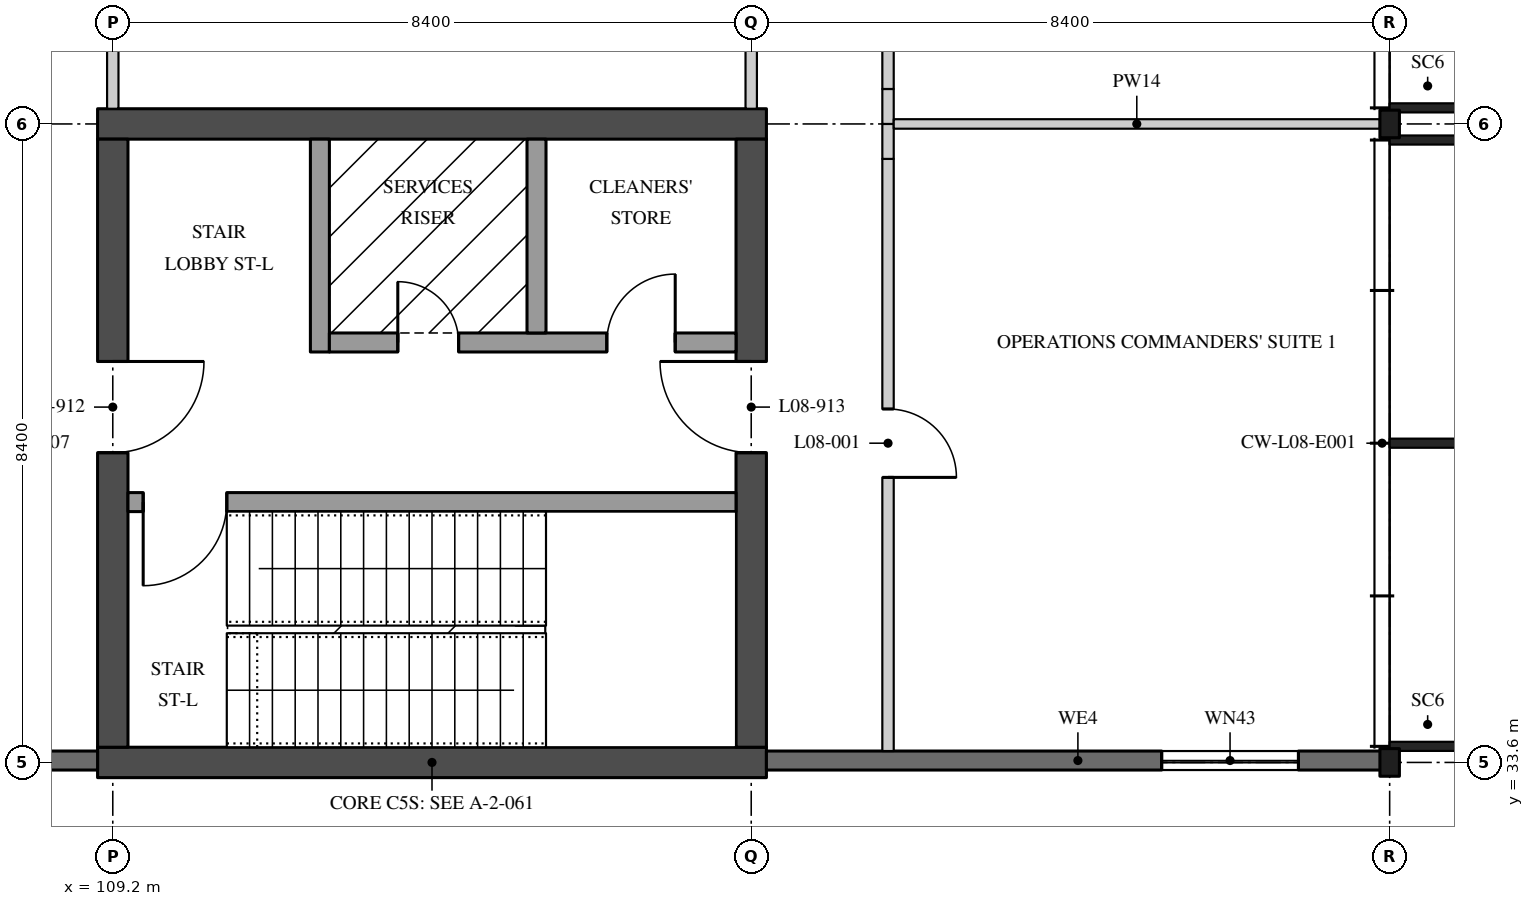
"""IFC4 building model, lengths in metres.
Left out: names, types, materials, properties, quantities, classifications, styles, units other than length and angle.
Written with IfcOpenShell. Run it as: python <this file> out.ifc"""

import sys

from ifc_helpers import new_model, si_unit, direction, frame, frame_2d, origin, origin_2d, place, context, subcontext, project, spatial, rectangle, i_section, extrude, element, fill, save


model = new_model("IFC4")
c1 = context("Model", 3, precision=1e-05, world=origin(), true_north=direction((0.0, 1.0)))
c2 = subcontext(c1, "Body", "Model", "MODEL_VIEW")
j1 = project(units=[si_unit("LENGTHUNIT", "METRE"), si_unit("PLANEANGLEUNIT", "RADIAN")], contexts=[c1])
p1 = place(None, origin())
s1 = spatial("IfcSite", under=j1, at=p1, CompositionType="ELEMENT")
p2 = place(p1, origin())
s2 = spatial("IfcBuilding", under=s1, at=p2, CompositionType="ELEMENT")
p3 = place(p2, frame((0.0, 0.0, 36.9)))
s3 = spatial("IfcBuildingStorey", under=s2, at=p3, CompositionType="ELEMENT", Elevation=36.9)
for number, where, z_axis, x_axis in (
    (1, (126.0, 33.6, 0.0), (0.0, 0.0, 1.0), (1.0, 0.0, 0.0)),
    (2, (126.0, 42.0, 0.0), (0.0, 0.0, 1.0), (1.0, 0.0, 0.0)),
):
    element("IfcColumn", number, at=place(p3, frame(where, z_axis=z_axis, x_axis=x_axis)), inside=s3, PredefinedType="COLUMN", context=c2, shape_type="SweptSolid", body=[
        extrude(i_section(OverallWidth=0.257, OverallDepth=0.363, WebThickness=0.013, FlangeThickness=0.022, FilletRadius=0.015, at=origin_2d()), origin(), (0.0, 0.0, 1.0), 4.37),
    ])
for number, where, z_axis, x_axis in (
    (3, (109.0, 33.6, 0.0), (0.0, 0.0, 1.0), (1.0, 0.0, 0.0)),
    (4, (109.0, 42.0, 0.0), (0.0, 0.0, 1.0), (1.0, 0.0, 0.0)),
):
    element("IfcWall", number, at=place(p3, frame(where, z_axis=z_axis, x_axis=x_axis)), inside=s3, PredefinedType="SHEAR", context=c2, shape_type="SweptSolid", body=[
        extrude(rectangle(XDim=8.8, YDim=0.4, at=frame_2d((4.4, 0.0))), origin(), (0.0, 0.0, 1.0), 4.37),
    ])
p4 = place(p3, frame((109.2, 33.8, 0.0), z_axis=(0.0, 0.0, 1.0), x_axis=(0.0, 1.0, 0.0)))
e5 = element("IfcWall", 5, at=p4, inside=s3, PredefinedType="SHEAR", context=c2, shape_type="SweptSolid", body=[
    extrude(rectangle(XDim=8.0, YDim=0.4, at=frame_2d((4.0, 0.0))), origin(), (0.0, 0.0, 1.0), 4.37),
])
p5 = place(p4, frame((3.875, 0.0, 0.0)))
e6 = element("IfcOpeningElement", 6, at=p5, cuts=e5, PredefinedType="OPENING", context=c2, shape_type="SweptSolid", body=[
    extrude(rectangle(XDim=1.2, YDim=2.1, at=frame_2d((0.6, 1.05))), frame((0.0, 0.21, 0.0), z_axis=(0.0, -1.0, 0.0), x_axis=(1.0, 0.0, 0.0)), (0.0, 0.0, 1.0), 0.42),
])
p6 = place(p3, frame((117.6, 33.8, 0.0), z_axis=(0.0, 0.0, 1.0), x_axis=(0.0, 1.0, 0.0)))
e7 = element("IfcWall", 7, at=p6, inside=s3, PredefinedType="SHEAR", context=c2, shape_type="SweptSolid", body=[
    extrude(rectangle(XDim=8.0, YDim=0.4, at=frame_2d((4.0, 0.0))), origin(), (0.0, 0.0, 1.0), 4.37),
])
p7 = place(p6, frame((3.875, 0.0, 0.0)))
e8 = element("IfcOpeningElement", 8, at=p7, cuts=e7, PredefinedType="OPENING", context=c2, shape_type="SweptSolid", body=[
    extrude(rectangle(XDim=1.2, YDim=2.1, at=frame_2d((0.6, 1.05))), frame((0.0, 0.21, 0.0), z_axis=(0.0, -1.0, 0.0), x_axis=(1.0, 0.0, 0.0)), (0.0, 0.0, 1.0), 0.42),
])
p8 = place(p3, frame((109.4, 37.025, 0.0), z_axis=(0.0, 0.0, 1.0), x_axis=(1.0, 0.0, 0.0)))
e9 = element("IfcWall", 9, at=p8, inside=s3, PredefinedType="SOLIDWALL", context=c2, shape_type="SweptSolid", body=[
    extrude(rectangle(XDim=8.0, YDim=0.25, at=frame_2d((4.0, 0.0))), origin(), (0.0, 0.0, 1.0), 4.37),
])
p9 = place(p8, frame((0.2, 0.0, 0.0)))
e10 = element("IfcOpeningElement", 10, at=p9, cuts=e9, PredefinedType="OPENING", context=c2, shape_type="SweptSolid", body=[
    extrude(rectangle(XDim=1.1, YDim=2.1, at=frame_2d((0.55, 1.05))), frame((0.0, 0.135, 0.0), z_axis=(0.0, -1.0, 0.0), x_axis=(1.0, 0.0, 0.0)), (0.0, 0.0, 1.0), 0.27),
])
p10 = place(p3, frame((111.925, 39.0, 0.0), z_axis=(0.0, 0.0, 1.0), x_axis=(0.0, 1.0, 0.0)))
e11 = element("IfcWall", 11, at=p10, inside=s3, PredefinedType="SOLIDWALL", context=c2, shape_type="SweptSolid", body=[
    extrude(rectangle(XDim=2.8, YDim=0.25, at=frame_2d((1.4, 0.0))), origin(), (0.0, 0.0, 1.0), 4.37),
])
p11 = place(p3, frame((112.05, 39.125, 0.0), z_axis=(0.0, 0.0, 1.0), x_axis=(1.0, 0.0, 0.0)))
e12 = element("IfcWall", 12, at=p11, inside=s3, PredefinedType="SOLIDWALL", context=c2, shape_type="SweptSolid", body=[
    extrude(rectangle(XDim=5.35, YDim=0.25, at=frame_2d((2.675, 0.0))), origin(), (0.0, 0.0, 1.0), 4.37),
])
p12 = place(p11, frame((3.65, 0.0, 0.0)))
e13 = element("IfcOpeningElement", 13, at=p12, cuts=e12, PredefinedType="OPENING", context=c2, shape_type="SweptSolid", body=[
    extrude(rectangle(XDim=0.9, YDim=2.1, at=frame_2d((0.45, 1.05))), frame((0.0, 0.135, 0.0), z_axis=(0.0, -1.0, 0.0), x_axis=(1.0, 0.0, 0.0)), (0.0, 0.0, 1.0), 0.27),
])
p13 = place(p11, frame((0.9, 0.0, 0.0)))
e14 = element("IfcOpeningElement", 14, at=p13, cuts=e12, PredefinedType="OPENING", context=c2, shape_type="SweptSolid", body=[
    extrude(rectangle(XDim=0.8, YDim=2.1, at=frame_2d((0.4, 1.05))), frame((0.0, 0.135, 0.0), z_axis=(0.0, -1.0, 0.0), x_axis=(1.0, 0.0, 0.0)), (0.0, 0.0, 1.0), 0.27),
])
p14 = place(p3, frame((114.775, 39.25, 0.0), z_axis=(0.0, 0.0, 1.0), x_axis=(0.0, 1.0, 0.0)))
e15 = element("IfcWall", 15, at=p14, inside=s3, PredefinedType="SOLIDWALL", context=c2, shape_type="SweptSolid", body=[
    extrude(rectangle(XDim=2.55, YDim=0.25, at=frame_2d((1.275, 0.0))), origin(), (0.0, 0.0, 1.0), 4.37),
])
p15 = place(p3, frame((119.4, 33.75, 0.0), z_axis=(0.0, 0.0, 1.0), x_axis=(0.0, 1.0, 0.0)))
e16 = element("IfcWall", 16, at=p15, inside=s3, PredefinedType="PARTITIONING", context=c2, shape_type="SweptSolid", body=[
    extrude(rectangle(XDim=7.79, YDim=0.15, at=frame_2d((3.895, 0.0))), origin(), (0.0, 0.0, 1.0), 4.37),
])
p16 = place(p15, frame((3.6, 0.0, 0.0)))
e17 = element("IfcOpeningElement", 17, at=p16, cuts=e16, PredefinedType="OPENING", context=c2, shape_type="SweptSolid", body=[
    extrude(rectangle(XDim=0.9, YDim=2.1, at=frame_2d((0.45, 1.05))), frame((0.0, 0.085, 0.0), z_axis=(0.0, -1.0, 0.0), x_axis=(1.0, 0.0, 0.0)), (0.0, 0.0, 1.0), 0.17),
])
for number, where, z_axis, x_axis in (
    (18, (119.4, 41.54, 0.0), (0.0, 0.0, 1.0), (0.0, 1.0, 0.0)),
    (19, (119.4, 42.0, 0.0), (0.0, 0.0, 1.0), (0.0, 1.0, 0.0)),
):
    element("IfcWall", number, at=place(p3, frame(where, z_axis=z_axis, x_axis=x_axis)), inside=s3, PredefinedType="PARTITIONING", context=c2, shape_type="SweptSolid", body=[
        extrude(rectangle(XDim=0.46, YDim=0.15, at=frame_2d((0.23, 0.0))), origin(), (0.0, 0.0, 1.0), 3.817),
    ])
p17 = place(p3, frame((119.4, 42.46, 0.0), z_axis=(0.0, 0.0, 1.0), x_axis=(0.0, 1.0, 0.0)))
e20 = element("IfcWall", 20, at=p17, inside=s3, PredefinedType="PARTITIONING", context=c2, shape_type="SweptSolid", body=[
    extrude(rectangle(XDim=7.48, YDim=0.15, at=frame_2d((3.74, 0.0))), origin(), (0.0, 0.0, 1.0), 4.37),
])
p18 = place(p17, frame((3.29, 0.0, 0.0)))
e21 = element("IfcOpeningElement", 21, at=p18, cuts=e20, PredefinedType="OPENING", context=c2, shape_type="SweptSolid", body=[
    extrude(rectangle(XDim=0.9, YDim=2.1, at=frame_2d((0.45, 1.05))), frame((0.0, 0.085, 0.0), z_axis=(0.0, -1.0, 0.0), x_axis=(1.0, 0.0, 0.0)), (0.0, 0.0, 1.0), 0.17),
])
p19 = place(p3, frame((117.6, 42.2, 0.0), z_axis=(0.0, 0.0, 1.0), x_axis=(0.0, 1.0, 0.0)))
e22 = element("IfcWall", 22, at=p19, inside=s3, PredefinedType="PARTITIONING", context=c2, shape_type="SweptSolid", body=[
    extrude(rectangle(XDim=8.0, YDim=0.15, at=frame_2d((4.0, 0.0))), origin(), (0.0, 0.0, 1.0), 3.817),
])
p20 = place(p19, frame((2.35, 0.0, 0.0)))
e23 = element("IfcOpeningElement", 23, at=p20, cuts=e22, PredefinedType="OPENING", context=c2, shape_type="SweptSolid", body=[
    extrude(rectangle(XDim=1.2, YDim=2.4, at=frame_2d((0.6, 1.2))), frame((0.0, 0.085, 0.0), z_axis=(0.0, -1.0, 0.0), x_axis=(1.0, 0.0, 0.0)), (0.0, 0.0, 1.0), 0.17),
])
p21 = place(p3, frame((109.2, 42.2, 0.0), z_axis=(0.0, 0.0, 1.0), x_axis=(0.0, 1.0, 0.0)))
e24 = element("IfcWall", 24, at=p21, inside=s3, PredefinedType="PARTITIONING", context=c2, shape_type="SweptSolid", body=[
    extrude(rectangle(XDim=8.0, YDim=0.15, at=frame_2d((4.0, 0.0))), origin(), (0.0, 0.0, 1.0), 3.817),
])
p22 = place(p21, frame((3.4, 0.0, 0.0)))
e25 = element("IfcOpeningElement", 25, at=p22, cuts=e24, PredefinedType="OPENING", context=c2, shape_type="SweptSolid", body=[
    extrude(rectangle(XDim=1.2, YDim=2.4, at=frame_2d((0.6, 1.2))), frame((0.0, 0.085, 0.0), z_axis=(0.0, -1.0, 0.0), x_axis=(1.0, 0.0, 0.0)), (0.0, 0.0, 1.0), 0.17),
])
p23 = place(p3, frame((119.475, 42.0, 0.0), z_axis=(0.0, 0.0, 1.0), x_axis=(1.0, 0.0, 0.0)))
e26 = element("IfcWall", 26, at=p23, inside=s3, PredefinedType="PARTITIONING", context=c2, shape_type="SweptSolid", body=[
    extrude(rectangle(XDim=6.396, YDim=0.125, at=frame_2d((3.198, 0.0))), origin(), (0.0, 0.0, 1.0), 3.817),
])
p24 = place(p3, frame((100.805, 33.625, 0.0), z_axis=(0.0, 0.0, 1.0), x_axis=(1.0, 0.0, 0.0)))
e27 = element("IfcWall", 27, at=p24, inside=s3, PredefinedType="SOLIDWALL", context=c2, shape_type="SweptSolid", body=[
    extrude(rectangle(XDim=8.195, YDim=0.25, at=frame_2d((4.097, 0.0))), origin(), (0.0, 0.0, 1.0), 3.819),
])
p25 = place(p24, frame((0.895, 0.0, 0.6)))
e28 = element("IfcOpeningElement", 28, at=p25, cuts=e27, PredefinedType="OPENING", context=c2, shape_type="SweptSolid", body=[
    extrude(rectangle(XDim=2.4, YDim=2.4, at=frame_2d((1.2, 1.2))), frame((0.0, 0.135, 0.0), z_axis=(0.0, -1.0, 0.0), x_axis=(1.0, 0.0, 0.0)), (0.0, 0.0, 1.0), 0.27),
])
p26 = place(p3, frame((117.8, 33.625, 0.0), z_axis=(0.0, 0.0, 1.0), x_axis=(1.0, 0.0, 0.0)))
e29 = element("IfcWall", 29, at=p26, inside=s3, PredefinedType="SOLIDWALL", context=c2, shape_type="SweptSolid", body=[
    extrude(rectangle(XDim=8.196, YDim=0.25, at=frame_2d((4.098, 0.0))), origin(), (0.0, 0.0, 1.0), 3.819),
])
p27 = place(p26, frame((5.2, 0.0, 0.6)))
e30 = element("IfcOpeningElement", 30, at=p27, cuts=e29, PredefinedType="OPENING", context=c2, shape_type="SweptSolid", body=[
    extrude(rectangle(XDim=1.8, YDim=2.4, at=frame_2d((0.9, 1.2))), frame((0.0, 0.135, 0.0), z_axis=(0.0, -1.0, 0.0), x_axis=(1.0, 0.0, 0.0)), (0.0, 0.0, 1.0), 0.27),
])
p28 = place(p12, origin())
e31 = element("IfcDoor", 31, at=p28, inside=s3, OperationType="SINGLE_SWING_LEFT", PredefinedType="DOOR", context=c2, shape_type="SweptSolid", body=[
    extrude(rectangle(XDim=0.9, YDim=2.1, at=frame_2d((0.45, 1.05))), frame((0.0, 0.035, 0.0), z_axis=(0.0, -1.0, 0.0), x_axis=(1.0, 0.0, 0.0)), (0.0, 0.0, 1.0), 0.07),
])
fill(e13, e31)
p29 = place(p5, frame((1.2, 0.0, 0.0), z_axis=(0.0, 0.0, 1.0), x_axis=(-1.0, 0.0, 0.0)))
e32 = element("IfcDoor", 32, at=p29, inside=s3, OperationType="SINGLE_SWING_RIGHT", PredefinedType="DOOR", context=c2, shape_type="SweptSolid", body=[
    extrude(rectangle(XDim=1.2, YDim=2.1, at=frame_2d((0.6, 1.05))), frame((0.0, 0.035, 0.0), z_axis=(0.0, -1.0, 0.0), x_axis=(1.0, 0.0, 0.0)), (0.0, 0.0, 1.0), 0.07),
])
fill(e6, e32)
p30 = place(p7, origin())
e33 = element("IfcDoor", 33, at=p30, inside=s3, OperationType="SINGLE_SWING_LEFT", PredefinedType="DOOR", context=c2, shape_type="SweptSolid", body=[
    extrude(rectangle(XDim=1.2, YDim=2.1, at=frame_2d((0.6, 1.05))), frame((0.0, 0.035, 0.0), z_axis=(0.0, -1.0, 0.0), x_axis=(1.0, 0.0, 0.0)), (0.0, 0.0, 1.0), 0.07),
])
fill(e8, e33)
p31 = place(p13, origin())
e34 = element("IfcDoor", 34, at=p31, inside=s3, OperationType="SINGLE_SWING_RIGHT", PredefinedType="DOOR", context=c2, shape_type="SweptSolid", body=[
    extrude(rectangle(XDim=0.8, YDim=2.1, at=frame_2d((0.4, 1.05))), frame((0.0, 0.035, 0.0), z_axis=(0.0, -1.0, 0.0), x_axis=(1.0, 0.0, 0.0)), (0.0, 0.0, 1.0), 0.07),
])
fill(e14, e34)
p32 = place(p9, frame((1.1, 0.0, 0.0), z_axis=(0.0, 0.0, 1.0), x_axis=(-1.0, 0.0, 0.0)))
e35 = element("IfcDoor", 35, at=p32, inside=s3, OperationType="SINGLE_SWING_LEFT", PredefinedType="DOOR", context=c2, shape_type="SweptSolid", body=[
    extrude(rectangle(XDim=1.1, YDim=2.1, at=frame_2d((0.55, 1.05))), frame((0.0, 0.035, 0.0), z_axis=(0.0, -1.0, 0.0), x_axis=(1.0, 0.0, 0.0)), (0.0, 0.0, 1.0), 0.07),
])
fill(e10, e35)
p33 = place(p16, frame((0.9, 0.0, 0.0), z_axis=(0.0, 0.0, 1.0), x_axis=(-1.0, 0.0, 0.0)))
e36 = element("IfcDoor", 36, at=p33, inside=s3, OperationType="SINGLE_SWING_LEFT", PredefinedType="DOOR", context=c2, shape_type="SweptSolid", body=[
    extrude(rectangle(XDim=0.9, YDim=2.1, at=frame_2d((0.45, 1.05))), frame((0.0, 0.025, 0.0), z_axis=(0.0, -1.0, 0.0), x_axis=(1.0, 0.0, 0.0)), (0.0, 0.0, 1.0), 0.05),
])
fill(e17, e36)
p34 = place(p27, origin())
e37 = element("IfcWindow", 37, at=p34, inside=s3, PartitioningType="SINGLE_PANEL", PredefinedType="WINDOW", context=c2, shape_type="SweptSolid", body=[
    extrude(rectangle(XDim=1.8, YDim=2.4, at=frame_2d((0.9, 1.2))), frame((0.0, 0.04, 0.0), z_axis=(0.0, -1.0, 0.0), x_axis=(1.0, 0.0, 0.0)), (0.0, 0.0, 1.0), 0.08),
])
fill(e30, e37)
save(model, sys.argv[1])
